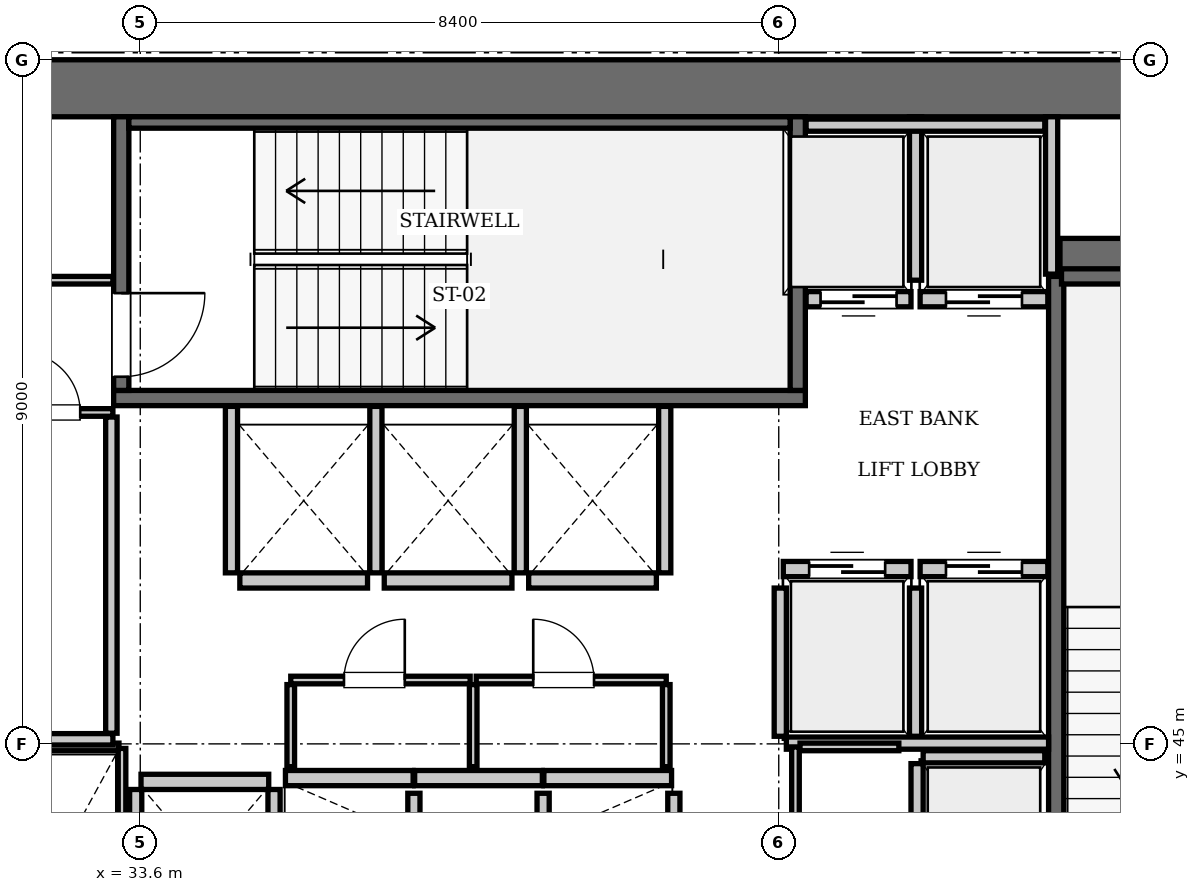
"""IFC4 building model, lengths in metres.
Left out: names, types, materials, properties, quantities, classifications, styles, units other than length and angle.
Written with IfcOpenShell. Run it as: python <this file> out.ifc"""

import sys

from ifc_helpers import new_model, si_unit, direction, frame, frame_2d, origin, place, context, subcontext, project, spatial, rectangle, extrude, element, fill, save


model = new_model("IFC4")
c1 = context("Model", 3, precision=1e-05, world=origin(), true_north=direction((0.0, 1.0)))
c2 = subcontext(c1, "Body", "Model", "MODEL_VIEW")
j1 = project(units=[si_unit("LENGTHUNIT", "METRE"), si_unit("PLANEANGLEUNIT", "RADIAN")], contexts=[c1])
p1 = place(None, origin())
s1 = spatial("IfcSite", under=j1, at=p1, CompositionType="ELEMENT")
p2 = place(p1, origin())
s2 = spatial("IfcBuilding", under=s1, at=p2, CompositionType="ELEMENT")
p3 = place(p2, frame((0.0, 0.0, 135.1)))
s3 = spatial("IfcBuildingStorey", under=s2, at=p3, CompositionType="ELEMENT", Elevation=135.1)
p4 = place(p3, frame((25.2, 53.625, 0.0), z_axis=(0.0, 0.0, 1.0), x_axis=(1.0, 0.0, 0.0)))
e1 = element("IfcWall", 1, at=p4, inside=s3, PredefinedType="SHEAR", context=c2, shape_type="SweptSolid", body=[
    extrude(rectangle(XDim=25.2, YDim=0.75, at=frame_2d((12.6, 0.0))), origin(), (0.0, 0.0, 1.0), 3.85),
])
p5 = place(p3, frame((45.7, 51.4, 0.0), z_axis=(0.0, 0.0, 1.0), x_axis=(1.0, 0.0, 0.0)))
e2 = element("IfcWall", 2, at=p5, inside=s3, PredefinedType="SHEAR", context=c2, shape_type="SweptSolid", body=[
    extrude(rectangle(XDim=3.95, YDim=0.5, at=frame_2d((1.975, 0.0))), origin(), (0.0, 0.0, 1.0), 3.85),
])
p6 = place(p3, frame((33.25, 49.55, 0.0), z_axis=(0.0, 0.0, 1.0), x_axis=(1.0, 0.0, 0.0)))
e3 = element("IfcWall", 3, at=p6, inside=s3, PredefinedType="SOLIDWALL", context=c2, shape_type="SweptSolid", body=[
    extrude(rectangle(XDim=9.1, YDim=0.2, at=frame_2d((4.55, 0.0))), origin(), (0.0, 0.0, 1.0), 3.61),
])
p7 = place(p3, frame((42.25, 49.65, 0.0), z_axis=(0.0, 0.0, 1.0), x_axis=(0.0, 1.0, 0.0)))
e4 = element("IfcWall", 4, at=p7, inside=s3, PredefinedType="SOLIDWALL", context=c2, shape_type="SweptSolid", body=[
    extrude(rectangle(XDim=3.6, YDim=0.2, at=frame_2d((1.8, 0.0))), origin(), (0.0, 0.0, 1.0), 3.61),
])
p8 = place(p3, frame((33.35, 49.65, 0.0), z_axis=(0.0, 0.0, 1.0), x_axis=(0.0, 1.0, 0.0)))
e5 = element("IfcWall", 5, at=p8, inside=s3, PredefinedType="SOLIDWALL", context=c2, shape_type="SweptSolid", body=[
    extrude(rectangle(XDim=3.6, YDim=0.2, at=frame_2d((1.8, 0.0))), origin(), (0.0, 0.0, 1.0), 3.61),
])
p9 = place(p8, frame((0.18, 0.0, 0.0)))
e6 = element("IfcOpeningElement", 6, at=p9, cuts=e5, PredefinedType="OPENING", context=c2, shape_type="SweptSolid", body=[
    extrude(rectangle(XDim=1.1, YDim=2.15, at=frame_2d((0.55, 1.075))), frame((0.0, 0.11, 0.0), z_axis=(0.0, -1.0, 0.0), x_axis=(1.0, 0.0, 0.0)), (0.0, 0.0, 1.0), 0.22),
])
p10 = place(p3, frame((33.45, 53.175, 0.0), z_axis=(0.0, 0.0, 1.0), x_axis=(1.0, 0.0, 0.0)))
e7 = element("IfcWall", 7, at=p10, inside=s3, PredefinedType="SOLIDWALL", context=c2, shape_type="SweptSolid", body=[
    extrude(rectangle(XDim=8.7, YDim=0.15, at=frame_2d((4.35, 0.0))), origin(), (0.0, 0.0, 1.0), 3.61),
])
p11 = place(p3, frame((45.65, 42.15, 0.0), z_axis=(0.0, 0.0, 1.0), x_axis=(0.0, 1.0, 0.0)))
e8 = element("IfcWall", 8, at=p11, inside=s3, PredefinedType="SOLIDWALL", context=c2, shape_type="SweptSolid", body=[
    extrude(rectangle(XDim=9.0, YDim=0.2, at=frame_2d((4.5, 0.0))), origin(), (0.0, 0.0, 1.0), 3.61),
])
p12 = place(p3, frame((45.72, 51.15, 0.0), z_axis=(0.0, 0.0, 1.0), x_axis=(1.0, 0.0, 0.0)))
e9 = element("IfcWall", 9, at=p12, inside=s3, PredefinedType="SOLIDWALL", context=c2, shape_type="SweptSolid", body=[
    extrude(rectangle(XDim=3.5, YDim=0.2, at=frame_2d((1.75, 0.0))), origin(), (0.0, 0.0, 1.0), 3.61),
])
p13 = place(p3, frame((42.06, 47.3, 0.0), z_axis=(0.0, 0.0, 1.0), x_axis=(1.0, 0.0, 0.0)))
e10 = element("IfcWall", 10, at=p13, inside=s3, PredefinedType="SOLIDWALL", context=c2, shape_type="SweptSolid", body=[
    extrude(rectangle(XDim=1.68, YDim=0.2, at=frame_2d((0.84, 0.0))), origin(), (0.0, 0.0, 1.0), 3.61),
])
p14 = place(p13, frame((0.34, 0.0, 0.0)))
e11 = element("IfcOpeningElement", 11, at=p14, cuts=e10, PredefinedType="OPENING", context=c2, shape_type="SweptSolid", body=[
    extrude(rectangle(XDim=1.0, YDim=2.15, at=frame_2d((0.5, 1.075))), frame((0.0, 0.11, 0.0), z_axis=(0.0, -1.0, 0.0), x_axis=(1.0, 0.0, 0.0)), (0.0, 0.0, 1.0), 0.22),
])
p15 = place(p3, frame((43.86, 47.3, 0.0), z_axis=(0.0, 0.0, 1.0), x_axis=(1.0, 0.0, 0.0)))
e12 = element("IfcWall", 12, at=p15, inside=s3, PredefinedType="SOLIDWALL", context=c2, shape_type="SweptSolid", body=[
    extrude(rectangle(XDim=1.68, YDim=0.2, at=frame_2d((0.84, 0.0))), origin(), (0.0, 0.0, 1.0), 3.61),
])
p16 = place(p15, frame((0.34, 0.0, 0.0)))
e13 = element("IfcOpeningElement", 13, at=p16, cuts=e12, PredefinedType="OPENING", context=c2, shape_type="SweptSolid", body=[
    extrude(rectangle(XDim=1.0, YDim=2.15, at=frame_2d((0.5, 1.075))), frame((0.0, 0.11, 0.0), z_axis=(0.0, -1.0, 0.0), x_axis=(1.0, 0.0, 0.0)), (0.0, 0.0, 1.0), 0.22),
])
p17 = place(p3, frame((42.36, 50.85, 0.0), z_axis=(0.0, 0.0, 1.0), x_axis=(1.0, 0.0, 0.0)))
e14 = element("IfcWall", 14, at=p17, inside=s3, PredefinedType="SOLIDWALL", context=c2, shape_type="SweptSolid", body=[
    extrude(rectangle(XDim=1.38, YDim=0.2, at=frame_2d((0.69, 0.0))), origin(), (0.0, 0.0, 1.0), 3.61),
])
p18 = place(p17, frame((0.19, 0.0, 0.0)))
e15 = element("IfcOpeningElement", 15, at=p18, cuts=e14, PredefinedType="OPENING", context=c2, shape_type="SweptSolid", body=[
    extrude(rectangle(XDim=1.0, YDim=2.15, at=frame_2d((0.5, 1.075))), frame((0.0, 0.11, 0.0), z_axis=(0.0, -1.0, 0.0), x_axis=(1.0, 0.0, 0.0)), (0.0, 0.0, 1.0), 0.22),
])
p19 = place(p3, frame((43.86, 50.85, 0.0), z_axis=(0.0, 0.0, 1.0), x_axis=(1.0, 0.0, 0.0)))
e16 = element("IfcWall", 16, at=p19, inside=s3, PredefinedType="SOLIDWALL", context=c2, shape_type="SweptSolid", body=[
    extrude(rectangle(XDim=1.68, YDim=0.2, at=frame_2d((0.84, 0.0))), origin(), (0.0, 0.0, 1.0), 3.61),
])
p20 = place(p19, frame((0.34, 0.0, 0.0)))
e17 = element("IfcOpeningElement", 17, at=p20, cuts=e16, PredefinedType="OPENING", context=c2, shape_type="SweptSolid", body=[
    extrude(rectangle(XDim=1.0, YDim=2.15, at=frame_2d((0.5, 1.075))), frame((0.0, 0.11, 0.0), z_axis=(0.0, -1.0, 0.0), x_axis=(1.0, 0.0, 0.0)), (0.0, 0.0, 1.0), 0.22),
])
for number, where, z_axis, x_axis in (
    (18, (35.51, 44.55, 0.0), (0.0, 0.0, 1.0), (1.0, 0.0, 0.0)),
    (19, (37.21, 44.55, 0.0), (0.0, 0.0, 1.0), (1.0, 0.0, 0.0)),
):
    element("IfcWall", number, at=place(p3, frame(where, z_axis=z_axis, x_axis=x_axis)), inside=s3, PredefinedType="SOLIDWALL", context=c2, shape_type="SweptSolid", body=[
        extrude(rectangle(XDim=1.68, YDim=0.2, at=frame_2d((0.84, 0.0))), origin(), (0.0, 0.0, 1.0), 3.61),
    ])
for number, where, z_axis, x_axis in (
    (20, (38.91, 44.55, 0.0), (0.0, 0.0, 1.0), (1.0, 0.0, 0.0)),
    (21, (34.91, 47.15, 0.0), (0.0, 0.0, 1.0), (1.0, 0.0, 0.0)),
):
    element("IfcWall", number, at=place(p3, frame(where, z_axis=z_axis, x_axis=x_axis)), inside=s3, PredefinedType="SOLIDWALL", context=c2, shape_type="SweptSolid", body=[
        extrude(rectangle(XDim=1.68, YDim=0.2, at=frame_2d((0.84, 0.0))), origin(), (0.0, 0.0, 1.0), 3.61),
    ])
for number, where, z_axis, x_axis in (
    (22, (36.81, 47.15, 0.0), (0.0, 0.0, 1.0), (1.0, 0.0, 0.0)),
    (23, (38.71, 47.15, 0.0), (0.0, 0.0, 1.0), (1.0, 0.0, 0.0)),
    (24, (33.61, 44.5, 0.0), (0.0, 0.0, 1.0), (1.0, 0.0, 0.0)),
):
    element("IfcWall", number, at=place(p3, frame(where, z_axis=z_axis, x_axis=x_axis)), inside=s3, PredefinedType="SOLIDWALL", context=c2, shape_type="SweptSolid", body=[
        extrude(rectangle(XDim=1.68, YDim=0.2, at=frame_2d((0.84, 0.0))), origin(), (0.0, 0.0, 1.0), 3.61),
    ])
p21 = place(p3, frame((43.9, 44.83, 0.0), z_axis=(0.0, 0.0, 1.0), x_axis=(1.0, 0.0, 0.0)))
e25 = element("IfcWall", 25, at=p21, inside=s3, PredefinedType="SOLIDWALL", context=c2, shape_type="SweptSolid", body=[
    extrude(rectangle(XDim=1.6, YDim=0.16, at=frame_2d((0.8, 0.0))), origin(), (0.0, 0.0, 1.0), 3.61),
])
p22 = place(p3, frame((43.82, 42.15, 0.0), z_axis=(0.0, 0.0, 1.0), x_axis=(0.0, 1.0, 0.0)))
e26 = element("IfcWall", 26, at=p22, inside=s3, PredefinedType="SOLIDWALL", context=c2, shape_type="SweptSolid", body=[
    extrude(rectangle(XDim=2.59, YDim=0.16, at=frame_2d((1.295, 0.0))), origin(), (0.0, 0.0, 1.0), 3.61),
])
for number, where, z_axis, x_axis in (
    (27, (42.02, 45.1, 0.0), (0.0, 0.0, 1.0), (0.0, 1.0, 0.0)),
    (28, (43.8, 45.1, 0.0), (0.0, 0.0, 1.0), (0.0, 1.0, 0.0)),
):
    element("IfcWall", number, at=place(p3, frame(where, z_axis=z_axis, x_axis=x_axis)), inside=s3, PredefinedType="SOLIDWALL", context=c2, shape_type="SweptSolid", body=[
        extrude(rectangle(XDim=1.95, YDim=0.16, at=frame_2d((0.975, 0.0))), origin(), (0.0, 0.0, 1.0), 3.61),
    ])
p23 = place(p3, frame((42.1, 45.01, 0.0), z_axis=(0.0, 0.0, 1.0), x_axis=(1.0, 0.0, 0.0)))
e29 = element("IfcWall", 29, at=p23, inside=s3, PredefinedType="SOLIDWALL", context=c2, shape_type="SweptSolid", body=[
    extrude(rectangle(XDim=3.45, YDim=0.16, at=frame_2d((1.725, 0.0))), origin(), (0.0, 0.0, 1.0), 3.61),
])
p24 = place(p3, frame((45.59, 51.18, 0.0), z_axis=(0.0, 0.0, 1.0), x_axis=(0.0, 1.0, 0.0)))
e30 = element("IfcWall", 30, at=p24, inside=s3, PredefinedType="SOLIDWALL", context=c2, shape_type="SweptSolid", body=[
    extrude(rectangle(XDim=2.07, YDim=0.16, at=frame_2d((1.035, 0.0))), origin(), (0.0, 0.0, 1.0), 3.61),
])
p25 = place(p3, frame((43.8, 51.1, 0.0), z_axis=(0.0, 0.0, 1.0), x_axis=(0.0, 1.0, 0.0)))
e31 = element("IfcWall", 31, at=p25, inside=s3, PredefinedType="SOLIDWALL", context=c2, shape_type="SweptSolid", body=[
    extrude(rectangle(XDim=2.15, YDim=0.16, at=frame_2d((1.075, 0.0))), origin(), (0.0, 0.0, 1.0), 3.61),
])
p26 = place(p3, frame((42.36, 53.14, 0.0), z_axis=(0.0, 0.0, 1.0), x_axis=(1.0, 0.0, 0.0)))
e32 = element("IfcWall", 32, at=p26, inside=s3, PredefinedType="SOLIDWALL", context=c2, shape_type="SweptSolid", body=[
    extrude(rectangle(XDim=3.14, YDim=0.16, at=frame_2d((1.57, 0.0))), origin(), (0.0, 0.0, 1.0), 3.61),
])
for number, where, z_axis, x_axis in (
    (33, (37.2, 42.15, 0.0), (0.0, 0.0, 1.0), (0.0, 1.0, 0.0)),
    (34, (38.9, 42.15, 0.0), (0.0, 0.0, 1.0), (0.0, 1.0, 0.0)),
    (35, (40.62, 42.15, 0.0), (0.0, 0.0, 1.0), (0.0, 1.0, 0.0)),
):
    element("IfcWall", number, at=place(p3, frame(where, z_axis=z_axis, x_axis=x_axis)), inside=s3, PredefinedType="SOLIDWALL", context=c2, shape_type="SweptSolid", body=[
        extrude(rectangle(XDim=2.2, YDim=0.16, at=frame_2d((1.1, 0.0))), origin(), (0.0, 0.0, 1.0), 3.61),
    ])
for number, where, z_axis, x_axis in (
    (36, (34.8, 47.25, 0.0), (0.0, 0.0, 1.0), (0.0, 1.0, 0.0)),
    (37, (36.7, 47.25, 0.0), (0.0, 0.0, 1.0), (0.0, 1.0, 0.0)),
    (38, (38.6, 47.25, 0.0), (0.0, 0.0, 1.0), (0.0, 1.0, 0.0)),
    (39, (40.5, 47.25, 0.0), (0.0, 0.0, 1.0), (0.0, 1.0, 0.0)),
):
    element("IfcWall", number, at=place(p3, frame(where, z_axis=z_axis, x_axis=x_axis)), inside=s3, PredefinedType="SOLIDWALL", context=c2, shape_type="SweptSolid", body=[
        extrude(rectangle(XDim=2.19, YDim=0.16, at=frame_2d((1.095, 0.0))), origin(), (0.0, 0.0, 1.0), 3.61),
    ])
for number, where, z_axis, x_axis in (
    (40, (33.54, 42.15, 0.0), (0.0, 0.0, 1.0), (0.0, 1.0, 0.0)),
    (41, (35.36, 42.15, 0.0), (0.0, 0.0, 1.0), (0.0, 1.0, 0.0)),
):
    element("IfcWall", number, at=place(p3, frame(where, z_axis=z_axis, x_axis=x_axis)), inside=s3, PredefinedType="SOLIDWALL", context=c2, shape_type="SweptSolid", body=[
        extrude(rectangle(XDim=2.25, YDim=0.16, at=frame_2d((1.125, 0.0))), origin(), (0.0, 0.0, 1.0), 3.61),
    ])
p27 = place(p3, frame((31.84, 44.96, 0.0), z_axis=(0.0, 0.0, 1.0), x_axis=(1.0, 0.0, 0.0)))
e42 = element("IfcWall", 42, at=p27, inside=s3, PredefinedType="PARTITIONING", context=c2, shape_type="SweptSolid", body=[
    extrude(rectangle(XDim=1.48, YDim=0.1, at=frame_2d((0.74, 0.0))), origin(), (0.0, 0.0, 1.0), 3.61),
])
p28 = place(p3, frame((33.36, 42.21, 0.0), z_axis=(0.0, 0.0, 1.0), x_axis=(0.0, 1.0, 0.0)))
e43 = element("IfcWall", 43, at=p28, inside=s3, PredefinedType="PARTITIONING", context=c2, shape_type="SweptSolid", body=[
    extrude(rectangle(XDim=2.73, YDim=0.1, at=frame_2d((1.365, 0.0))), origin(), (0.0, 0.0, 1.0), 3.61),
])
p29 = place(p3, frame((35.58, 45.84, 0.0), z_axis=(0.0, 0.0, 1.0), x_axis=(1.0, 0.0, 0.0)))
e44 = element("IfcWall", 44, at=p29, inside=s3, PredefinedType="PARTITIONING", context=c2, shape_type="SweptSolid", body=[
    extrude(rectangle(XDim=2.36, YDim=0.1, at=frame_2d((1.18, 0.0))), origin(), (0.0, 0.0, 1.0), 3.61),
])
p30 = place(p29, frame((0.7, 0.0, 0.0)))
e45 = element("IfcOpeningElement", 45, at=p30, cuts=e44, PredefinedType="OPENING", context=c2, shape_type="SweptSolid", body=[
    extrude(rectangle(XDim=0.8, YDim=2.05, at=frame_2d((0.4, 1.025))), frame((0.0, 0.06, 0.0), z_axis=(0.0, -1.0, 0.0), x_axis=(1.0, 0.0, 0.0)), (0.0, 0.0, 1.0), 0.12),
])
p31 = place(p3, frame((38.02, 45.84, 0.0), z_axis=(0.0, 0.0, 1.0), x_axis=(1.0, 0.0, 0.0)))
e46 = element("IfcWall", 46, at=p31, inside=s3, PredefinedType="PARTITIONING", context=c2, shape_type="SweptSolid", body=[
    extrude(rectangle(XDim=2.5, YDim=0.1, at=frame_2d((1.25, 0.0))), origin(), (0.0, 0.0, 1.0), 3.61),
])
p32 = place(p31, frame((0.75, 0.0, 0.0)))
e47 = element("IfcOpeningElement", 47, at=p32, cuts=e46, PredefinedType="OPENING", context=c2, shape_type="SweptSolid", body=[
    extrude(rectangle(XDim=0.8, YDim=2.05, at=frame_2d((0.4, 1.025))), frame((0.0, 0.06, 0.0), z_axis=(0.0, -1.0, 0.0), x_axis=(1.0, 0.0, 0.0)), (0.0, 0.0, 1.0), 0.12),
])
for number, where, z_axis, x_axis in (
    (48, (35.58, 44.7, 0.0), (0.0, 0.0, 1.0), (0.0, 1.0, 0.0)),
    (49, (37.98, 44.7, 0.0), (0.0, 0.0, 1.0), (0.0, 1.0, 0.0)),
    (50, (40.52, 44.7, 0.0), (0.0, 0.0, 1.0), (0.0, 1.0, 0.0)),
):
    element("IfcWall", number, at=place(p3, frame(where, z_axis=z_axis, x_axis=x_axis)), inside=s3, PredefinedType="PARTITIONING", context=c2, shape_type="SweptSolid", body=[
        extrude(rectangle(XDim=1.08, YDim=0.1, at=frame_2d((0.54, 0.0))), origin(), (0.0, 0.0, 1.0), 3.61),
    ])
p33 = place(p3, frame((42.22, 42.2, 0.0), z_axis=(0.0, 0.0, 1.0), x_axis=(0.0, 1.0, 0.0)))
e51 = element("IfcWall", 51, at=p33, inside=s3, PredefinedType="PARTITIONING", context=c2, shape_type="SweptSolid", body=[
    extrude(rectangle(XDim=2.76, YDim=0.1, at=frame_2d((1.38, 0.0))), origin(), (0.0, 0.0, 1.0), 3.61),
])
p34 = place(p33, frame((0.65, 0.0, 0.0)))
e52 = element("IfcOpeningElement", 52, at=p34, cuts=e51, PredefinedType="OPENING", context=c2, shape_type="SweptSolid", body=[
    extrude(rectangle(XDim=0.8, YDim=2.05, at=frame_2d((0.4, 1.025))), frame((0.0, 0.06, 0.0), z_axis=(0.0, -1.0, 0.0), x_axis=(1.0, 0.0, 0.0)), (0.0, 0.0, 1.0), 0.12),
])
p35 = place(p3, frame((42.28, 44.96, 0.0), z_axis=(0.0, 0.0, 1.0), x_axis=(1.0, 0.0, 0.0)))
e53 = element("IfcWall", 53, at=p35, inside=s3, PredefinedType="PARTITIONING", context=c2, shape_type="SweptSolid", body=[
    extrude(rectangle(XDim=1.3, YDim=0.1, at=frame_2d((0.65, 0.0))), origin(), (0.0, 0.0, 1.0), 3.61),
])
p36 = place(p3, frame((30.06, 45.06, 0.0), z_axis=(0.0, 0.0, 1.0), x_axis=(1.0, 0.0, 0.0)))
e54 = element("IfcWall", 54, at=p36, inside=s3, PredefinedType="PARTITIONING", context=c2, shape_type="SweptSolid", body=[
    extrude(rectangle(XDim=3.18, YDim=0.15, at=frame_2d((1.59, 0.0))), origin(), (0.0, 0.0, 1.0), 3.61),
])
p37 = place(p3, frame((33.22, 45.14, 0.0), z_axis=(0.0, 0.0, 1.0), x_axis=(0.0, 1.0, 0.0)))
e55 = element("IfcWall", 55, at=p37, inside=s3, PredefinedType="PARTITIONING", context=c2, shape_type="SweptSolid", body=[
    extrude(rectangle(XDim=4.16, YDim=0.15, at=frame_2d((2.08, 0.0))), origin(), (0.0, 0.0, 1.0), 3.61),
])
p38 = place(p3, frame((30.06, 49.36, 0.0), z_axis=(0.0, 0.0, 1.0), x_axis=(1.0, 0.0, 0.0)))
e56 = element("IfcWall", 56, at=p38, inside=s3, PredefinedType="PARTITIONING", context=c2, shape_type="SweptSolid", body=[
    extrude(rectangle(XDim=3.18, YDim=0.1, at=frame_2d((1.59, 0.0))), origin(), (0.0, 0.0, 1.0), 3.61),
])
p39 = place(p38, frame((1.95, 0.0, 0.0)))
e57 = element("IfcOpeningElement", 57, at=p39, cuts=e56, PredefinedType="OPENING", context=c2, shape_type="SweptSolid", body=[
    extrude(rectangle(XDim=0.8, YDim=2.05, at=frame_2d((0.4, 1.025))), frame((0.0, 0.06, 0.0), z_axis=(0.0, -1.0, 0.0), x_axis=(1.0, 0.0, 0.0)), (0.0, 0.0, 1.0), 0.12),
])
p40 = place(p3, frame((31.82, 51.1, 0.0), z_axis=(0.0, 0.0, 1.0), x_axis=(1.0, 0.0, 0.0)))
e58 = element("IfcWall", 58, at=p40, inside=s3, PredefinedType="PARTITIONING", context=c2, shape_type="SweptSolid", body=[
    extrude(rectangle(XDim=1.42, YDim=0.1, at=frame_2d((0.71, 0.0))), origin(), (0.0, 0.0, 1.0), 3.61),
])
p41 = place(p9, frame((1.1, 0.0, 0.0), z_axis=(0.0, 0.0, 1.0), x_axis=(-1.0, 0.0, 0.0)))
e59 = element("IfcDoor", 59, at=p41, inside=s3, OperationType="SINGLE_SWING_LEFT", PredefinedType="DOOR", context=c2, shape_type="SweptSolid", body=[
    extrude(rectangle(XDim=1.1, YDim=2.15, at=frame_2d((0.55, 1.075))), frame((0.0, 0.025, 0.0), z_axis=(0.0, -1.0, 0.0), x_axis=(1.0, 0.0, 0.0)), (0.0, 0.0, 1.0), 0.05),
])
fill(e6, e59)
p42 = place(p14, origin())
e60 = element("IfcDoor", 60, at=p42, inside=s3, OperationType="SLIDING_TO_LEFT", PredefinedType="DOOR", context=c2, shape_type="SweptSolid", body=[
    extrude(rectangle(XDim=1.0, YDim=2.15, at=frame_2d((0.5, 1.075))), frame((0.0, 0.025, 0.0), z_axis=(0.0, -1.0, 0.0), x_axis=(1.0, 0.0, 0.0)), (0.0, 0.0, 1.0), 0.05),
])
fill(e11, e60)
p43 = place(p16, origin())
e61 = element("IfcDoor", 61, at=p43, inside=s3, OperationType="SLIDING_TO_LEFT", PredefinedType="DOOR", context=c2, shape_type="SweptSolid", body=[
    extrude(rectangle(XDim=1.0, YDim=2.15, at=frame_2d((0.5, 1.075))), frame((0.0, 0.025, 0.0), z_axis=(0.0, -1.0, 0.0), x_axis=(1.0, 0.0, 0.0)), (0.0, 0.0, 1.0), 0.05),
])
fill(e13, e61)
p44 = place(p18, frame((1.0, 0.0, 0.0), z_axis=(0.0, 0.0, 1.0), x_axis=(-1.0, 0.0, 0.0)))
e62 = element("IfcDoor", 62, at=p44, inside=s3, OperationType="SLIDING_TO_LEFT", PredefinedType="DOOR", context=c2, shape_type="SweptSolid", body=[
    extrude(rectangle(XDim=1.0, YDim=2.15, at=frame_2d((0.5, 1.075))), frame((0.0, 0.025, 0.0), z_axis=(0.0, -1.0, 0.0), x_axis=(1.0, 0.0, 0.0)), (0.0, 0.0, 1.0), 0.05),
])
fill(e15, e62)
p45 = place(p20, frame((1.0, 0.0, 0.0), z_axis=(0.0, 0.0, 1.0), x_axis=(-1.0, 0.0, 0.0)))
e63 = element("IfcDoor", 63, at=p45, inside=s3, OperationType="SLIDING_TO_LEFT", PredefinedType="DOOR", context=c2, shape_type="SweptSolid", body=[
    extrude(rectangle(XDim=1.0, YDim=2.15, at=frame_2d((0.5, 1.075))), frame((0.0, 0.025, 0.0), z_axis=(0.0, -1.0, 0.0), x_axis=(1.0, 0.0, 0.0)), (0.0, 0.0, 1.0), 0.05),
])
fill(e17, e63)
p46 = place(p30, origin())
e64 = element("IfcDoor", 64, at=p46, inside=s3, OperationType="SINGLE_SWING_RIGHT", PredefinedType="DOOR", context=c2, shape_type="SweptSolid", body=[
    extrude(rectangle(XDim=0.8, YDim=2.05, at=frame_2d((0.4, 1.025))), frame((0.0, 0.025, 0.0), z_axis=(0.0, -1.0, 0.0), x_axis=(1.0, 0.0, 0.0)), (0.0, 0.0, 1.0), 0.05),
])
fill(e45, e64)
p47 = place(p32, origin())
e65 = element("IfcDoor", 65, at=p47, inside=s3, OperationType="SINGLE_SWING_LEFT", PredefinedType="DOOR", context=c2, shape_type="SweptSolid", body=[
    extrude(rectangle(XDim=0.8, YDim=2.05, at=frame_2d((0.4, 1.025))), frame((0.0, 0.025, 0.0), z_axis=(0.0, -1.0, 0.0), x_axis=(1.0, 0.0, 0.0)), (0.0, 0.0, 1.0), 0.05),
])
fill(e47, e65)
p48 = place(p39, origin())
e66 = element("IfcDoor", 66, at=p48, inside=s3, OperationType="SINGLE_SWING_LEFT", PredefinedType="DOOR", context=c2, shape_type="SweptSolid", body=[
    extrude(rectangle(XDim=0.8, YDim=2.05, at=frame_2d((0.4, 1.025))), frame((0.0, 0.025, 0.0), z_axis=(0.0, -1.0, 0.0), x_axis=(1.0, 0.0, 0.0)), (0.0, 0.0, 1.0), 0.05),
])
fill(e57, e66)
save(model, sys.argv[1])
